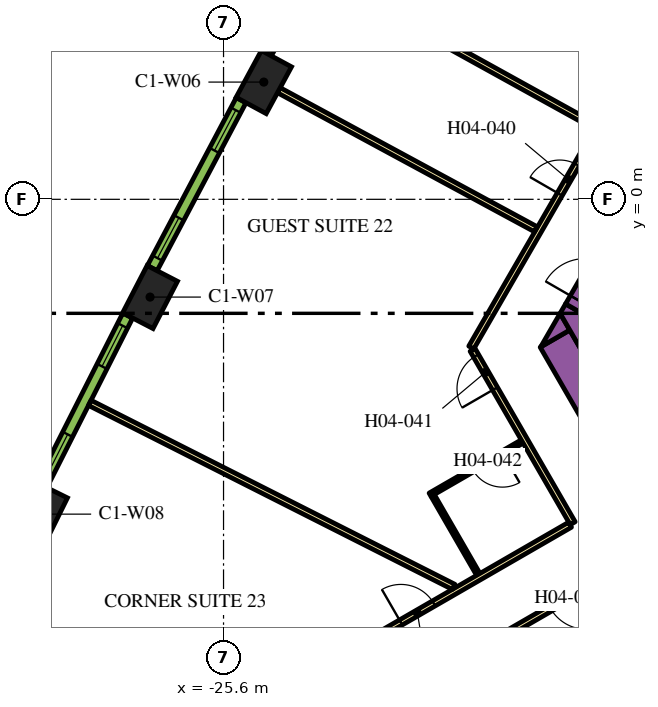
"""IFC4 building model, lengths in metres.
Left out: names, types, materials, properties, quantities, classifications, styles, units other than length and angle.
Written with IfcOpenShell. Run it as: python <this file> out.ifc"""

import sys

from ifc_helpers import new_model, si_unit, direction, frame, frame_2d, origin, origin_2d, place, context, subcontext, project, spatial, polyline, rectangle, outline, extrude, element, fill, save


model = new_model("IFC4")
c1 = context("Model", 3, precision=1e-05, world=origin(), true_north=direction((0.0, 1.0)))
c2 = subcontext(c1, "Body", "Model", "MODEL_VIEW")
j1 = project(units=[si_unit("LENGTHUNIT", "METRE"), si_unit("PLANEANGLEUNIT", "RADIAN")], contexts=[c1])
p1 = place(None, origin())
s1 = spatial("IfcSite", under=j1, at=p1, CompositionType="ELEMENT")
p2 = place(p1, origin())
s2 = spatial("IfcBuilding", under=s1, at=p2, CompositionType="ELEMENT")
p3 = place(p2, frame((0.0, 0.0, 70.5)))
s3 = spatial("IfcBuildingStorey", under=s2, at=p3, CompositionType="ELEMENT", Elevation=70.5)
for number, where, z_axis, x_axis in (
    (1, (-24.54, 3.085, 0.0), (0.0, 0.0, 1.0), (-0.476, -0.88, 0.0)),
    (2, (-27.533, -2.572, 0.0), (0.0, 0.0, 1.0), (-0.459, -0.888, 0.0)),
    (3, (-30.421, -8.284, 0.0), (0.0, 0.0, 1.0), (-0.443, -0.897, 0.0)),
):
    element("IfcColumn", number, at=place(p3, frame(where, z_axis=z_axis, x_axis=x_axis)), inside=s3, PredefinedType="COLUMN", context=c2, shape_type="SweptSolid", body=[
        extrude(rectangle(XDim=1.4, YDim=0.9, at=origin_2d()), origin(), (0.0, 0.0, 1.0), 3.9),
    ])
p4 = place(p3, frame((-12.134, -11.883, 0.0), z_axis=(0.0, 0.0, 1.0), x_axis=(-0.500005339912, 0.866022320763, 0.0)))
e4 = element("IfcWall", 4, at=p4, inside=s3, PredefinedType="SOLIDWALL", context=c2, shape_type="SweptSolid", body=[
    extrude(rectangle(XDim=9.488, YDim=0.9, at=frame_2d((4.744, 0.0))), origin(), (0.0, 0.0, 1.0), 3.9),
])
p5 = place(p3, origin())
e5 = element("IfcWall", 5, at=p5, inside=s3, PredefinedType="SOLIDWALL", context=c2, shape_type="SweptSolid", body=[
    extrude(outline(polyline([(-16.489, -3.44), (-17.251, -3.88), (-16.743, -3.0), (-16.489, -3.44)])), origin(), (0.0, 0.0, 1.0), 3.9),
])
e6 = element("IfcWall", 6, at=p5, inside=s3, PredefinedType="SOLIDWALL", context=c2, shape_type="SweptSolid", body=[
    extrude(outline(polyline([(-15.82, -3.201), (-16.223, -3.9), (-16.743, -3.0), (-16.599, -2.751), (-15.82, -3.201)])), origin(), (0.0, 0.0, 1.0), 3.9),
])
p6 = place(p3, frame((-16.209, -2.976, 0.0), z_axis=(0.0, 0.0, 1.0), x_axis=(0.499954529098, 0.86605165483, 0.0)))
e7 = element("IfcWall", 7, at=p6, inside=s3, PredefinedType="SOLIDWALL", context=c2, shape_type="SweptSolid", body=[
    extrude(rectangle(XDim=1.7, YDim=0.9, at=frame_2d((0.85, 0.0))), origin(), (0.0, 0.0, 1.0), 3.9),
])
p7 = place(p6, frame((0.25, 0.0, 0.0)))
e8 = element("IfcOpeningElement", 8, at=p7, cuts=e7, PredefinedType="OPENING", context=c2, shape_type="SweptSolid", body=[
    extrude(rectangle(XDim=1.2, YDim=2.1, at=frame_2d((0.6, 1.05))), frame((0.0, 0.46, 0.0), z_axis=(0.0, -1.0, 0.0), x_axis=(1.0, 0.0, 0.0)), (0.0, 0.0, 1.0), 0.92),
])
p8 = place(p3, frame((-19.081, -3.9, 0.0), z_axis=(0.0, 0.0, 1.0), x_axis=(0.499998313975, 0.866026377209, 0.0)))
e9 = element("IfcWall", 9, at=p8, inside=s3, PredefinedType="PARTITIONING", context=c2, shape_type="SweptSolid", body=[
    extrude(rectangle(XDim=25.766, YDim=0.15, at=frame_2d((12.883, 0.0))), origin(), (0.0, 0.0, 1.0), 2.75),
])
p9 = place(p8, frame((24.586, 0.0, 0.0)))
e10 = element("IfcOpeningElement", 10, at=p9, cuts=e9, PredefinedType="OPENING", context=c2, shape_type="SweptSolid", body=[
    extrude(rectangle(XDim=1.0, YDim=2.1, at=frame_2d((0.5, 1.05))), frame((0.0, 0.085, 0.0), z_axis=(0.0, -1.0, 0.0), x_axis=(1.0, 0.0, 0.0)), (0.0, 0.0, 1.0), 0.17),
])
p10 = place(p8, frame((9.948, 0.0, 0.0)))
e11 = element("IfcOpeningElement", 11, at=p10, cuts=e9, PredefinedType="OPENING", context=c2, shape_type="SweptSolid", body=[
    extrude(rectangle(XDim=1.0, YDim=2.1, at=frame_2d((0.5, 1.05))), frame((0.0, 0.085, 0.0), z_axis=(0.0, -1.0, 0.0), x_axis=(1.0, 0.0, 0.0)), (0.0, 0.0, 1.0), 0.17),
])
p11 = place(p8, frame((7.782, 0.0, 0.0)))
e12 = element("IfcOpeningElement", 12, at=p11, cuts=e9, PredefinedType="OPENING", context=c2, shape_type="SweptSolid", body=[
    extrude(rectangle(XDim=0.9, YDim=2.1, at=frame_2d((0.45, 1.05))), frame((0.0, 0.085, 0.0), z_axis=(0.0, -1.0, 0.0), x_axis=(1.0, 0.0, 0.0)), (0.0, 0.0, 1.0), 0.17),
])
p12 = place(p8, frame((4.658, 0.0, 0.0)))
e13 = element("IfcOpeningElement", 13, at=p12, cuts=e9, PredefinedType="OPENING", context=c2, shape_type="SweptSolid", body=[
    extrude(rectangle(XDim=0.9, YDim=2.1, at=frame_2d((0.45, 1.05))), frame((0.0, 0.085, 0.0), z_axis=(0.0, -1.0, 0.0), x_axis=(1.0, 0.0, 0.0)), (0.0, 0.0, 1.0), 0.17),
])
p13 = place(p3, frame((-16.412, -8.523, 0.0), z_axis=(0.0, 0.0, 1.0), x_axis=(-0.500001929737, 0.866024289647, 0.0)))
e14 = element("IfcWall", 14, at=p13, inside=s3, PredefinedType="PARTITIONING", context=c2, shape_type="SweptSolid", body=[
    extrude(rectangle(XDim=5.268, YDim=0.15, at=frame_2d((2.634, 0.0))), origin(), (0.0, 0.0, 1.0), 2.75),
])
p14 = place(p13, frame((4.088, 0.0, 0.0)))
e15 = element("IfcOpeningElement", 15, at=p14, cuts=e14, PredefinedType="OPENING", context=c2, shape_type="SweptSolid", body=[
    extrude(rectangle(XDim=1.0, YDim=2.1, at=frame_2d((0.5, 1.05))), frame((0.0, 0.085, 0.0), z_axis=(0.0, -1.0, 0.0), x_axis=(1.0, 0.0, 0.0)), (0.0, 0.0, 1.0), 0.17),
])
p15 = place(p3, frame((-30.463, -16.635, 0.0), z_axis=(0.0, 0.0, 1.0), x_axis=(0.866022394896, 0.500005211512, 0.0)))
e16 = element("IfcWall", 16, at=p15, inside=s3, PredefinedType="PARTITIONING", context=c2, shape_type="SweptSolid", body=[
    extrude(rectangle(XDim=16.144, YDim=0.15, at=frame_2d((8.072, 0.0))), origin(), (0.0, 0.0, 1.0), 2.75),
])
p16 = place(p15, frame((11.004, 0.0, 0.0)))
e17 = element("IfcOpeningElement", 17, at=p16, cuts=e16, PredefinedType="OPENING", context=c2, shape_type="SweptSolid", body=[
    extrude(rectangle(XDim=1.0, YDim=2.1, at=frame_2d((0.5, 1.05))), frame((0.0, 0.085, 0.0), z_axis=(0.0, -1.0, 0.0), x_axis=(1.0, 0.0, 0.0)), (0.0, 0.0, 1.0), 0.17),
])
p17 = place(p3, frame((-15.587, -9.952, 0.0), z_axis=(0.0, 0.0, 1.0), x_axis=(-0.866022197818, -0.500005552856, 0.0)))
e18 = element("IfcWall", 18, at=p17, inside=s3, PredefinedType="PARTITIONING", context=c2, shape_type="SweptSolid", body=[
    extrude(rectangle(XDim=16.224, YDim=0.15, at=frame_2d((8.112, 0.0))), origin(), (0.0, 0.0, 1.0), 2.75),
])
p18 = place(p17, frame((0.527, 0.0, 0.0)))
e19 = element("IfcOpeningElement", 19, at=p18, cuts=e18, PredefinedType="OPENING", context=c2, shape_type="SweptSolid", body=[
    extrude(rectangle(XDim=1.1, YDim=2.1, at=frame_2d((0.55, 1.05))), frame((0.0, 0.085, 0.0), z_axis=(0.0, -1.0, 0.0), x_axis=(1.0, 0.0, 0.0)), (0.0, 0.0, 1.0), 0.17),
])
p19 = place(p3, frame((-29.12, -5.356, 0.0), z_axis=(0.0, 0.0, 1.0), x_axis=(0.892401965553, -0.451241323327, 0.0)))
e20 = element("IfcWall", 20, at=p19, inside=s3, PredefinedType="PARTITIONING", context=c2, shape_type="SweptSolid", body=[
    extrude(rectangle(XDim=10.729, YDim=0.15, at=frame_2d((5.364, 0.0))), origin(), (0.0, 0.0, 1.0), 2.75),
])
p20 = place(p3, frame((-24.145, 2.871, 0.0), z_axis=(0.0, 0.0, 1.0), x_axis=(0.879551725039, -0.475803281809, 0.0)))
e21 = element("IfcWall", 21, at=p20, inside=s3, PredefinedType="PARTITIONING", context=c2, shape_type="SweptSolid", body=[
    extrude(rectangle(XDim=7.688, YDim=0.15, at=frame_2d((3.844, 0.0))), origin(), (0.0, 0.0, 1.0), 2.75),
])
p21 = place(p3, frame((-23.132, 5.962, 0.0), z_axis=(0.0, 0.0, 1.0), x_axis=(0.875121716713, -0.483902863121, 0.0)))
e22 = element("IfcWall", 22, at=p21, inside=s3, PredefinedType="PARTITIONING", context=c2, shape_type="SweptSolid", body=[
    extrude(rectangle(XDim=8.355, YDim=0.15, at=frame_2d((4.178, 0.0))), origin(), (0.0, 0.0, 1.0), 2.75),
])
p22 = place(p3, frame((-17.74, -6.373, 0.0), z_axis=(0.0, 0.0, 1.0), x_axis=(-0.866018616679, -0.500011755427, 0.0)))
e23 = element("IfcWall", 23, at=p22, inside=s3, PredefinedType="PARTITIONING", context=c2, shape_type="SweptSolid", body=[
    extrude(rectangle(XDim=2.8, YDim=0.1, at=frame_2d((1.4, 0.0))), origin(), (0.0, 0.0, 1.0), 2.75),
])
p23 = place(p22, frame((0.6, 0.0, 0.0)))
e24 = element("IfcOpeningElement", 24, at=p23, cuts=e23, PredefinedType="OPENING", context=c2, shape_type="SweptSolid", body=[
    extrude(rectangle(XDim=0.9, YDim=2.1, at=frame_2d((0.45, 1.05))), frame((0.0, 0.06, 0.0), z_axis=(0.0, -1.0, 0.0), x_axis=(1.0, 0.0, 0.0)), (0.0, 0.0, 1.0), 0.12),
])
p24 = place(p3, frame((-20.092, -7.8, 0.0), z_axis=(0.0, 0.0, 1.0), x_axis=(0.499940577336, -0.866059708757, 0.0)))
e25 = element("IfcWall", 25, at=p24, inside=s3, PredefinedType="PARTITIONING", context=c2, shape_type="SweptSolid", body=[
    extrude(rectangle(XDim=2.39, YDim=0.1, at=frame_2d((1.195, 0.0))), origin(), (0.0, 0.0, 1.0), 2.75),
])
p25 = place(p3, frame((-22.05, 8.22, 0.0), z_axis=(0.0, 0.0, 1.0), x_axis=(-0.483912572871, -0.875116347589, 0.0)))
e26 = element("IfcWall", 26, at=p25, inside=s3, PredefinedType="SOLIDWALL", context=c2, shape_type="SweptSolid", body=[
    extrude(rectangle(XDim=4.998, YDim=0.29, at=frame_2d((2.499, 0.0))), origin(), (0.0, 0.0, 1.0), 3.65),
])
p26 = place(p25, frame((0.297, 0.0, 0.9)))
e27 = element("IfcOpeningElement", 27, at=p26, cuts=e26, PredefinedType="OPENING", context=c2, shape_type="SweptSolid", body=[
    extrude(rectangle(XDim=1.2, YDim=2.15, at=frame_2d((0.6, 1.075))), frame((0.0, 0.155, 0.0), z_axis=(0.0, -1.0, 0.0), x_axis=(1.0, 0.0, 0.0)), (0.0, 0.0, 1.0), 0.31),
])
p27 = place(p25, frame((3.501, 0.0, 0.9)))
e28 = element("IfcOpeningElement", 28, at=p27, cuts=e26, PredefinedType="OPENING", context=c2, shape_type="SweptSolid", body=[
    extrude(rectangle(XDim=1.2, YDim=2.15, at=frame_2d((0.6, 1.075))), frame((0.0, 0.155, 0.0), z_axis=(0.0, -1.0, 0.0), x_axis=(1.0, 0.0, 0.0)), (0.0, 0.0, 1.0), 0.31),
])
p28 = place(p3, frame((-25.138, 2.608, 0.0), z_axis=(0.0, 0.0, 1.0), x_axis=(-0.467629620899, -0.883924509026, 0.0)))
e29 = element("IfcWall", 29, at=p28, inside=s3, PredefinedType="SOLIDWALL", context=c2, shape_type="SweptSolid", body=[
    extrude(rectangle(XDim=4.998, YDim=0.29, at=frame_2d((2.499, 0.0))), origin(), (0.0, 0.0, 1.0), 3.65),
])
p29 = place(p28, frame((0.297, 0.0, 0.9)))
e30 = element("IfcOpeningElement", 30, at=p29, cuts=e29, PredefinedType="OPENING", context=c2, shape_type="SweptSolid", body=[
    extrude(rectangle(XDim=1.2, YDim=2.15, at=frame_2d((0.6, 1.075))), frame((0.0, 0.155, 0.0), z_axis=(0.0, -1.0, 0.0), x_axis=(1.0, 0.0, 0.0)), (0.0, 0.0, 1.0), 0.31),
])
p30 = place(p28, frame((3.501, 0.0, 0.9)))
e31 = element("IfcOpeningElement", 31, at=p30, cuts=e29, PredefinedType="OPENING", context=c2, shape_type="SweptSolid", body=[
    extrude(rectangle(XDim=1.2, YDim=2.15, at=frame_2d((0.6, 1.075))), frame((0.0, 0.155, 0.0), z_axis=(0.0, -1.0, 0.0), x_axis=(1.0, 0.0, 0.0)), (0.0, 0.0, 1.0), 0.31),
])
p31 = place(p3, frame((-28.122, -3.06, 0.0), z_axis=(0.0, 0.0, 1.0), x_axis=(-0.451233929645, -0.892405704115, 0.0)))
e32 = element("IfcWall", 32, at=p31, inside=s3, PredefinedType="SOLIDWALL", context=c2, shape_type="SweptSolid", body=[
    extrude(rectangle(XDim=4.998, YDim=0.29, at=frame_2d((2.499, 0.0))), origin(), (0.0, 0.0, 1.0), 3.65),
])
p32 = place(p31, frame((0.297, 0.0, 0.9)))
e33 = element("IfcOpeningElement", 33, at=p32, cuts=e32, PredefinedType="OPENING", context=c2, shape_type="SweptSolid", body=[
    extrude(rectangle(XDim=1.2, YDim=2.15, at=frame_2d((0.6, 1.075))), frame((0.0, 0.155, 0.0), z_axis=(0.0, -1.0, 0.0), x_axis=(1.0, 0.0, 0.0)), (0.0, 0.0, 1.0), 0.31),
])
p33 = place(p31, frame((3.501, 0.0, 0.9)))
e34 = element("IfcOpeningElement", 34, at=p33, cuts=e32, PredefinedType="OPENING", context=c2, shape_type="SweptSolid", body=[
    extrude(rectangle(XDim=1.2, YDim=2.15, at=frame_2d((0.6, 1.075))), frame((0.0, 0.155, 0.0), z_axis=(0.0, -1.0, 0.0), x_axis=(1.0, 0.0, 0.0)), (0.0, 0.0, 1.0), 0.31),
])
p34 = place(p18, origin())
e35 = element("IfcDoor", 35, at=p34, inside=s3, OperationType="SINGLE_SWING_LEFT", PredefinedType="DOOR", context=c2, shape_type="SweptSolid", body=[
    extrude(rectangle(XDim=1.1, YDim=2.1, at=frame_2d((0.55, 1.05))), frame((0.0, 0.025, 0.0), z_axis=(0.0, -1.0, 0.0), x_axis=(1.0, 0.0, 0.0)), (0.0, 0.0, 1.0), 0.05),
])
fill(e19, e35)
p35 = place(p12, origin())
e36 = element("IfcDoor", 36, at=p35, inside=s3, OperationType="SINGLE_SWING_LEFT", PredefinedType="DOOR", context=c2, shape_type="SweptSolid", body=[
    extrude(rectangle(XDim=0.9, YDim=2.1, at=frame_2d((0.45, 1.05))), frame((0.0, 0.025, 0.0), z_axis=(0.0, -1.0, 0.0), x_axis=(1.0, 0.0, 0.0)), (0.0, 0.0, 1.0), 0.05),
])
fill(e13, e36)
p36 = place(p14, origin())
e37 = element("IfcDoor", 37, at=p36, inside=s3, OperationType="SINGLE_SWING_RIGHT", PredefinedType="DOOR", context=c2, shape_type="SweptSolid", body=[
    extrude(rectangle(XDim=1.0, YDim=2.1, at=frame_2d((0.5, 1.05))), frame((0.0, 0.025, 0.0), z_axis=(0.0, -1.0, 0.0), x_axis=(1.0, 0.0, 0.0)), (0.0, 0.0, 1.0), 0.05),
])
fill(e15, e37)
p37 = place(p23, origin())
e38 = element("IfcDoor", 38, at=p37, inside=s3, OperationType="SINGLE_SWING_LEFT", PredefinedType="DOOR", context=c2, shape_type="SweptSolid", body=[
    extrude(rectangle(XDim=0.9, YDim=2.1, at=frame_2d((0.45, 1.05))), frame((0.0, 0.025, 0.0), z_axis=(0.0, -1.0, 0.0), x_axis=(1.0, 0.0, 0.0)), (0.0, 0.0, 1.0), 0.05),
])
fill(e24, e38)
p38 = place(p16, origin())
e39 = element("IfcDoor", 39, at=p38, inside=s3, OperationType="SINGLE_SWING_RIGHT", PredefinedType="DOOR", context=c2, shape_type="SweptSolid", body=[
    extrude(rectangle(XDim=1.0, YDim=2.1, at=frame_2d((0.5, 1.05))), frame((0.0, 0.025, 0.0), z_axis=(0.0, -1.0, 0.0), x_axis=(1.0, 0.0, 0.0)), (0.0, 0.0, 1.0), 0.05),
])
fill(e17, e39)
p39 = place(p29, origin())
e40 = element("IfcWindow", 40, at=p39, inside=s3, PartitioningType="DOUBLE_PANEL_VERTICAL", PredefinedType="WINDOW", context=c2, shape_type="SweptSolid", body=[
    extrude(rectangle(XDim=1.2, YDim=2.15, at=frame_2d((0.6, 1.075))), frame((0.0, 0.015, 0.0), z_axis=(0.0, -1.0, 0.0), x_axis=(1.0, 0.0, 0.0)), (0.0, 0.0, 1.0), 0.06),
])
fill(e30, e40)
p40 = place(p30, origin())
e41 = element("IfcWindow", 41, at=p40, inside=s3, PartitioningType="DOUBLE_PANEL_VERTICAL", PredefinedType="WINDOW", context=c2, shape_type="SweptSolid", body=[
    extrude(rectangle(XDim=1.2, YDim=2.15, at=frame_2d((0.6, 1.075))), frame((0.0, 0.015, 0.0), z_axis=(0.0, -1.0, 0.0), x_axis=(1.0, 0.0, 0.0)), (0.0, 0.0, 1.0), 0.06),
])
fill(e31, e41)
p41 = place(p32, origin())
e42 = element("IfcWindow", 42, at=p41, inside=s3, PartitioningType="DOUBLE_PANEL_VERTICAL", PredefinedType="WINDOW", context=c2, shape_type="SweptSolid", body=[
    extrude(rectangle(XDim=1.2, YDim=2.15, at=frame_2d((0.6, 1.075))), frame((0.0, 0.015, 0.0), z_axis=(0.0, -1.0, 0.0), x_axis=(1.0, 0.0, 0.0)), (0.0, 0.0, 1.0), 0.06),
])
fill(e33, e42)
p42 = place(p33, origin())
e43 = element("IfcWindow", 43, at=p42, inside=s3, PartitioningType="DOUBLE_PANEL_VERTICAL", PredefinedType="WINDOW", context=c2, shape_type="SweptSolid", body=[
    extrude(rectangle(XDim=1.2, YDim=2.15, at=frame_2d((0.6, 1.075))), frame((0.0, 0.015, 0.0), z_axis=(0.0, -1.0, 0.0), x_axis=(1.0, 0.0, 0.0)), (0.0, 0.0, 1.0), 0.06),
])
fill(e34, e43)
save(model, sys.argv[1])
